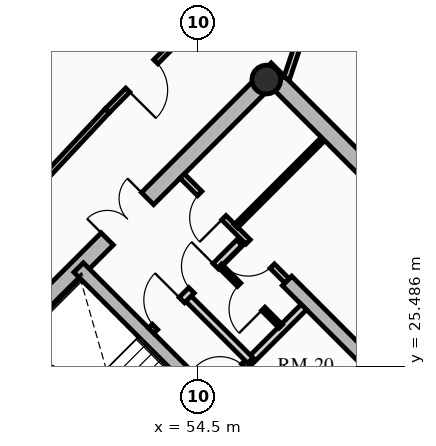
"""IFC4 building model, lengths in metres.
Left out: names, types, materials, properties, quantities, classifications, styles, units other than length and angle.
Written with IfcOpenShell. Run it as: python <this file> out.ifc"""

import sys

from ifc_helpers import new_model, si_unit, direction, frame, frame_2d, origin, origin_2d, place, context, subcontext, project, spatial, rectangle, hollow_circle, extrude, source, transform, mapped, element, fill, save


model = new_model("IFC4")
c1 = context("Model", 3, precision=1e-05, world=origin(), true_north=direction((0.0, 1.0)))
c2 = subcontext(c1, "Body", "Model", "MODEL_VIEW")
j1 = project(units=[si_unit("LENGTHUNIT", "METRE"), si_unit("PLANEANGLEUNIT", "RADIAN")], contexts=[c1])
p1 = place(None, origin())
s1 = spatial("IfcSite", under=j1, at=p1, CompositionType="ELEMENT")
p2 = place(p1, origin())
s2 = spatial("IfcBuilding", under=s1, at=p2, CompositionType="ELEMENT")
p3 = place(p2, frame((0.0, 0.0, 140.32)))
s3 = spatial("IfcBuildingStorey", under=s2, at=p3, CompositionType="ELEMENT", Elevation=140.32)
for number, where, z_axis, x_axis in (
    (1, (58.737, 15.697, 0.0), (0.0, 0.0, 1.0), (-0.707, 0.707, 0.0)),
    (2, (66.303, 23.263, 0.0), (0.0, 0.0, 1.0), (-0.707, 0.707, 0.0)),
):
    element("IfcWall", number, at=place(p3, frame(where, z_axis=z_axis, x_axis=x_axis)), inside=s3, PredefinedType="SHEAR", context=c2, shape_type="SweptSolid", body=[
        extrude(rectangle(XDim=14.2, YDim=0.45, at=frame_2d((7.1, 0.0))), origin(), (0.0, 0.0, 1.0), 3.72),
    ])
p4 = place(p3, frame((48.856, 25.578, 0.0), z_axis=(0.0, 0.0, 1.0), x_axis=(0.707106781187, 0.707106781187, 0.0)))
e3 = element("IfcWall", 3, at=p4, inside=s3, PredefinedType="SHEAR", context=c2, shape_type="SweptSolid", body=[
    extrude(rectangle(XDim=10.7, YDim=0.45, at=frame_2d((5.35, 0.0))), origin(), (0.0, 0.0, 1.0), 3.72),
])
m1 = source(origin(), c2, "Body", "SweptSolid", [
    extrude(rectangle(XDim=1.5, YDim=2.02, at=frame_2d((0.75, 1.01))), frame((0.0, 0.235, 0.0), z_axis=(0.0, -1.0, 0.0), x_axis=(1.0, 0.0, 0.0)), (0.0, 0.0, 1.0), 0.47),
])
p5 = place(p4, frame((4.6, 0.0, 0.0)))
e4 = element("IfcOpeningElement", 4, at=p5, cuts=e3, PredefinedType="OPENING", context=c2, shape_type="MappedRepresentation", body=[
    mapped(m1, transform((0.0, 0.0, 0.0), x_axis=(1.0, 0.0, 0.0), y_axis=(0.0, 1.0, 0.0), z_axis=(0.0, 0.0, 1.0), scale=1.0)),
])
p6 = place(p3, frame((61.078, 18.355, 0.0), z_axis=(0.0, 0.0, 1.0), x_axis=(-0.707106781187, 0.707106781187, 0.0)))
e5 = element("IfcWall", 5, at=p6, inside=s3, PredefinedType="SHEAR", context=c2, shape_type="SweptSolid", body=[
    extrude(rectangle(XDim=13.75, YDim=0.35, at=frame_2d((6.875, 0.0))), origin(), (0.0, 0.0, 1.0), 3.72),
])
m2 = source(origin(), c2, "Body", "SweptSolid", [
    extrude(rectangle(XDim=1.1, YDim=2.015, at=frame_2d((0.55, 1.007))), frame((0.0, 0.185, 0.0), z_axis=(0.0, -1.0, 0.0), x_axis=(1.0, 0.0, 0.0)), (0.0, 0.0, 1.0), 0.37),
])
p7 = place(p6, frame((4.875, 0.0, 0.0)))
e6 = element("IfcOpeningElement", 6, at=p7, cuts=e5, PredefinedType="OPENING", context=c2, shape_type="MappedRepresentation", body=[
    mapped(m2, transform((0.0, 0.0, 0.0), x_axis=(1.0, 0.0, 0.0), y_axis=(0.0, 1.0, 0.0), z_axis=(0.0, 0.0, 1.0), scale=1.0)),
])
p8 = place(p6, frame((0.65, 0.0, 0.0)))
e7 = element("IfcOpeningElement", 7, at=p8, cuts=e5, PredefinedType="OPENING", context=c2, shape_type="MappedRepresentation", body=[
    mapped(m2, transform((0.0, 0.0, 0.0), x_axis=(1.0, 0.0, 0.0), y_axis=(0.0, 1.0, 0.0), z_axis=(0.0, 0.0, 1.0), scale=1.0)),
])
p9 = place(p6, frame((2.65, 0.0, 0.0)))
e8 = element("IfcOpeningElement", 8, at=p9, cuts=e5, PredefinedType="OPENING", context=c2, shape_type="MappedRepresentation", body=[
    mapped(m2, transform((0.0, 0.0, 0.0), x_axis=(1.0, 0.0, 0.0), y_axis=(0.0, 1.0, 0.0), z_axis=(0.0, 0.0, 1.0), scale=1.0)),
])
m3 = source(origin(), c2, "Body", "SweptSolid", [
    extrude(rectangle(XDim=1.15, YDim=2.02, at=frame_2d((0.575, 1.01))), frame((0.0, 0.185, 0.0), z_axis=(0.0, -1.0, 0.0), x_axis=(1.0, 0.0, 0.0)), (0.0, 0.0, 1.0), 0.37),
])
p10 = place(p6, frame((7.295, 0.0, 0.0)))
e9 = element("IfcOpeningElement", 9, at=p10, cuts=e5, PredefinedType="OPENING", context=c2, shape_type="MappedRepresentation", body=[
    mapped(m3, transform((0.0, 0.0, 0.0), x_axis=(1.0, 0.0, 0.0), y_axis=(0.0, 1.0, 0.0), z_axis=(0.0, 0.0, 1.0), scale=1.0)),
])
p11 = place(p3, frame((63.645, 20.922, 0.0), z_axis=(0.0, 0.0, 1.0), x_axis=(-0.70711946392, 0.707094098226, 0.0)))
e10 = element("IfcWall", 10, at=p11, inside=s3, PredefinedType="SHEAR", context=c2, shape_type="SweptSolid", body=[
    extrude(rectangle(XDim=9.625, YDim=0.35, at=frame_2d((4.812, 0.0))), origin(), (0.0, 0.0, 1.0), 3.72),
])
p12 = place(p11, frame((5.305, 0.0, 0.0)))
e11 = element("IfcOpeningElement", 11, at=p12, cuts=e10, PredefinedType="OPENING", context=c2, shape_type="MappedRepresentation", body=[
    mapped(m3, transform((0.0, 0.0, 0.0), x_axis=(1.0, 0.0, 0.0), y_axis=(0.0, 1.0, 0.0), z_axis=(0.0, 0.0, 1.0), scale=1.0)),
])
p13 = place(p3, frame((53.922, 21.141, 0.0), z_axis=(0.0, 0.0, 1.0), x_axis=(-0.707088616009, 0.707124945897, 0.0)))
e12 = element("IfcWall", 12, at=p13, inside=s3, PredefinedType="SHEAR", context=c2, shape_type="SweptSolid", body=[
    extrude(rectangle(XDim=6.72, YDim=0.35, at=frame_2d((3.36, 0.0))), origin(), (0.0, 0.0, 1.0), 3.72),
])
p14 = place(p3, frame((56.294, 33.024, 0.0), z_axis=(0.0, 0.0, 1.0), x_axis=(0.707106781187, 0.707106781187, 0.0)))
e13 = element("IfcColumn", 13, at=p14, inside=s3, PredefinedType="COLUMN", context=c2, shape_type="SweptSolid", body=[
    extrude(hollow_circle(Radius=0.38, WallThickness=0.032, at=origin_2d()), origin(), (0.0, 0.0, 1.0), 3.72),
])
p15 = place(p3, frame((54.961, 24.719, 0.0), z_axis=(0.0, 0.0, 1.0), x_axis=(0.707106781187, 0.707106781187, 0.0)))
e14 = element("IfcWall", 14, at=p15, inside=s3, PredefinedType="PARTITIONING", context=c2, shape_type="SweptSolid", body=[
    extrude(rectangle(XDim=3.28, YDim=0.2, at=frame_2d((1.64, 0.0))), origin(), (0.0, 0.0, 1.0), 3.465),
])
m4 = source(origin(), c2, "Body", "SweptSolid", [
    extrude(rectangle(XDim=0.9, YDim=2.005, at=frame_2d((0.45, 1.002))), frame((0.0, 0.11, 0.0), z_axis=(0.0, -1.0, 0.0), x_axis=(1.0, 0.0, 0.0)), (0.0, 0.0, 1.0), 0.22),
])
p16 = place(p15, frame((0.16, 0.0, 0.0)))
e15 = element("IfcOpeningElement", 15, at=p16, cuts=e14, PredefinedType="OPENING", context=c2, shape_type="MappedRepresentation", body=[
    mapped(m4, transform((0.0, 0.0, 0.0), x_axis=(1.0, 0.0, 0.0), y_axis=(0.0, 1.0, 0.0), z_axis=(0.0, 0.0, 1.0), scale=1.0)),
])
p17 = place(p3, frame((55.874, 25.631, 0.0), z_axis=(0.0, 0.0, 1.0), x_axis=(-0.707157639372, 0.707055919343, 0.0)))
e16 = element("IfcWall", 16, at=p17, inside=s3, PredefinedType="PARTITIONING", context=c2, shape_type="SweptSolid", body=[
    extrude(rectangle(XDim=2.4, YDim=0.2, at=frame_2d((1.2, 0.0))), origin(), (0.0, 0.0, 1.0), 3.465),
])
p18 = place(p3, frame((53.264, 26.416, 0.0), z_axis=(0.0, 0.0, 1.0), x_axis=(0.707106781187, 0.707106781187, 0.0)))
e17 = element("IfcWall", 17, at=p18, inside=s3, PredefinedType="PARTITIONING", context=c2, shape_type="SweptSolid", body=[
    extrude(rectangle(XDim=3.28, YDim=0.2, at=frame_2d((1.64, 0.0))), origin(), (0.0, 0.0, 1.0), 3.465),
])
m5 = source(origin(), c2, "Body", "SweptSolid", [
    extrude(rectangle(XDim=1.0, YDim=2.015, at=frame_2d((0.5, 1.007))), frame((0.0, 0.11, 0.0), z_axis=(0.0, -1.0, 0.0), x_axis=(1.0, 0.0, 0.0)), (0.0, 0.0, 1.0), 0.22),
])
p19 = place(p18, frame((0.14, 0.0, 0.0)))
e18 = element("IfcOpeningElement", 18, at=p19, cuts=e17, PredefinedType="OPENING", context=c2, shape_type="MappedRepresentation", body=[
    mapped(m5, transform((0.0, 0.0, 0.0), x_axis=(1.0, 0.0, 0.0), y_axis=(0.0, 1.0, 0.0), z_axis=(0.0, 0.0, 1.0), scale=1.0)),
])
p20 = place(p18, frame((1.5, 0.0, 0.0)))
e19 = element("IfcOpeningElement", 19, at=p20, cuts=e17, PredefinedType="OPENING", context=c2, shape_type="MappedRepresentation", body=[
    mapped(m4, transform((0.0, 0.0, 0.0), x_axis=(1.0, 0.0, 0.0), y_axis=(0.0, 1.0, 0.0), z_axis=(0.0, 0.0, 1.0), scale=1.0)),
])
p21 = place(p3, frame((56.673, 26.529, 0.0), z_axis=(0.0, 0.0, 1.0), x_axis=(-0.707052764397, 0.70716079385, 0.0)))
e20 = element("IfcWall", 20, at=p21, inside=s3, PredefinedType="PARTITIONING", context=c2, shape_type="SweptSolid", body=[
    extrude(rectangle(XDim=2.26, YDim=0.125, at=frame_2d((1.13, 0.0))), origin(), (0.0, 0.0, 1.0), 3.465),
])
m6 = source(origin(), c2, "Body", "SweptSolid", [
    extrude(rectangle(XDim=0.9, YDim=2.005, at=frame_2d((0.45, 1.002))), frame((0.0, 0.073, 0.0), z_axis=(0.0, -1.0, 0.0), x_axis=(1.0, 0.0, 0.0)), (0.0, 0.0, 1.0), 0.145),
])
p22 = place(p21, frame((0.65, 0.0, 0.0)))
e21 = element("IfcOpeningElement", 21, at=p22, cuts=e20, PredefinedType="OPENING", context=c2, shape_type="MappedRepresentation", body=[
    mapped(m6, transform((0.0, 0.0, 0.0), x_axis=(1.0, 0.0, 0.0), y_axis=(0.0, 1.0, 0.0), z_axis=(0.0, 0.0, 1.0), scale=1.0)),
])
p23 = place(p3, frame((56.839, 27.728, 0.0), z_axis=(0.0, 0.0, 1.0), x_axis=(-0.707106781187, 0.707106781187, 0.0)))
e22 = element("IfcWall", 22, at=p23, inside=s3, PredefinedType="PARTITIONING", context=c2, shape_type="SweptSolid", body=[
    extrude(rectangle(XDim=3.9, YDim=0.16, at=frame_2d((1.95, 0.0))), origin(), (0.0, 0.0, 1.0), 3.465),
])
m7 = source(origin(), c2, "Body", "SweptSolid", [
    extrude(rectangle(XDim=0.9, YDim=2.005, at=frame_2d((0.45, 1.002))), frame((0.0, 0.09, 0.0), z_axis=(0.0, -1.0, 0.0), x_axis=(1.0, 0.0, 0.0)), (0.0, 0.0, 1.0), 0.18),
])
p24 = place(p23, frame((0.55, 0.0, 0.0)))
e23 = element("IfcOpeningElement", 23, at=p24, cuts=e22, PredefinedType="OPENING", context=c2, shape_type="MappedRepresentation", body=[
    mapped(m7, transform((0.0, 0.0, 0.0), x_axis=(1.0, 0.0, 0.0), y_axis=(0.0, 1.0, 0.0), z_axis=(0.0, 0.0, 1.0), scale=1.0)),
])
p25 = place(p23, frame((2.35, 0.0, 0.0)))
e24 = element("IfcOpeningElement", 24, at=p25, cuts=e22, PredefinedType="OPENING", context=c2, shape_type="MappedRepresentation", body=[
    mapped(m7, transform((0.0, 0.0, 0.0), x_axis=(1.0, 0.0, 0.0), y_axis=(0.0, 1.0, 0.0), z_axis=(0.0, 0.0, 1.0), scale=1.0)),
])
p26 = place(p3, frame((55.492, 29.167, 0.0), z_axis=(0.0, 0.0, 1.0), x_axis=(0.707144688645, 0.707068871696, 0.0)))
e25 = element("IfcWall", 25, at=p26, inside=s3, PredefinedType="PARTITIONING", context=c2, shape_type="SweptSolid", body=[
    extrude(rectangle(XDim=3.22, YDim=0.125, at=frame_2d((1.61, 0.0))), origin(), (0.0, 0.0, 1.0), 3.002),
])
p27 = place(p3, frame((54.475, 34.591, 0.0), z_axis=(0.0, 0.0, 1.0), x_axis=(-0.703869646439, -0.710329163714, 0.0)))
e26 = element("IfcWall", 26, at=p27, inside=s3, PredefinedType="PARTITIONING", context=c2, shape_type="SweptSolid", body=[
    extrude(rectangle(XDim=3.364, YDim=0.15, at=frame_2d((1.682, 0.0))), origin(), (0.0, 0.0, 1.0), 3.035),
])
m8 = source(origin(), c2, "Body", "SweptSolid", [
    extrude(rectangle(XDim=1.05, YDim=2.015, at=frame_2d((0.525, 1.007))), frame((0.0, 0.085, 0.0), z_axis=(0.0, -1.0, 0.0), x_axis=(1.0, 0.0, 0.0)), (0.0, 0.0, 1.0), 0.17),
])
p28 = place(p27, frame((1.546, 0.0, 0.0)))
e27 = element("IfcOpeningElement", 27, at=p28, cuts=e26, PredefinedType="OPENING", context=c2, shape_type="MappedRepresentation", body=[
    mapped(m8, transform((0.0, 0.0, 0.0), x_axis=(1.0, 0.0, 0.0), y_axis=(0.0, 1.0, 0.0), z_axis=(0.0, 0.0, 1.0), scale=1.0)),
])
p29 = place(p3, frame((52.107, 32.202, 0.0), z_axis=(0.0, 0.0, 1.0), x_axis=(-0.682605209028, -0.730787334734, 0.0)))
e28 = element("IfcWall", 28, at=p29, inside=s3, PredefinedType="PARTITIONING", context=c2, shape_type="SweptSolid", body=[
    extrude(rectangle(XDim=6.486, YDim=0.15, at=frame_2d((3.243, 0.0))), origin(), (0.0, 0.0, 1.0), 3.035),
])
p30 = place(p3, frame((56.828, 33.056, 0.0), z_axis=(0.0, 0.0, 1.0), x_axis=(0.319439175969, 0.94760678177, 0.0)))
e29 = element("IfcWall", 29, at=p30, inside=s3, PredefinedType="PARTITIONING", context=c2, shape_type="SweptSolid", body=[
    extrude(rectangle(XDim=2.074, YDim=0.16, at=frame_2d((1.037, 0.0))), origin(), (0.0, 0.0, 1.0), 3.035),
])
m9 = source(origin(), c2, "Body", "SweptSolid", [
    extrude(rectangle(XDim=1.05, YDim=2.015, at=frame_2d((0.525, 1.007))), frame((0.0, 0.09, 0.0), z_axis=(0.0, -1.0, 0.0), x_axis=(1.0, 0.0, 0.0)), (0.0, 0.0, 1.0), 0.18),
])
p31 = place(p30, frame((0.824, 0.0, 0.0)))
e30 = element("IfcOpeningElement", 30, at=p31, cuts=e29, PredefinedType="OPENING", context=c2, shape_type="MappedRepresentation", body=[
    mapped(m9, transform((0.0, 0.0, 0.0), x_axis=(1.0, 0.0, 0.0), y_axis=(0.0, 1.0, 0.0), z_axis=(0.0, 0.0, 1.0), scale=1.0)),
])
m10 = source(origin(), c2, "Body", "SweptSolid", [
    extrude(rectangle(XDim=1.5, YDim=2.02, at=frame_2d((0.75, 1.01))), frame((0.0, 0.025, 0.0), z_axis=(0.0, -1.0, 0.0), x_axis=(1.0, 0.0, 0.0)), (0.0, 0.0, 1.0), 0.05),
])
p32 = place(p5, origin())
e31 = element("IfcDoor", 31, at=p32, inside=s3, OperationType="DOUBLE_DOOR_SINGLE_SWING", PredefinedType="DOOR", context=c2, shape_type="MappedRepresentation", body=[
    mapped(m10, transform((0.0, 0.0, 0.0), x_axis=(1.0, 0.0, 0.0), y_axis=(0.0, 1.0, 0.0), z_axis=(0.0, 0.0, 1.0), scale=1.0)),
])
fill(e4, e31)
m11 = source(origin(), c2, "Body", "SweptSolid", [
    extrude(rectangle(XDim=0.9, YDim=2.005, at=frame_2d((0.45, 1.002))), frame((0.0, 0.025, 0.0), z_axis=(0.0, -1.0, 0.0), x_axis=(1.0, 0.0, 0.0)), (0.0, 0.0, 1.0), 0.05),
])
p33 = place(p16, origin())
e32 = element("IfcDoor", 32, at=p33, inside=s3, OperationType="SINGLE_SWING_LEFT", PredefinedType="DOOR", context=c2, shape_type="MappedRepresentation", body=[
    mapped(m11, transform((0.0, 0.0, 0.0), x_axis=(1.0, 0.0, 0.0), y_axis=(0.0, 1.0, 0.0), z_axis=(0.0, 0.0, 1.0), scale=1.0)),
])
fill(e15, e32)
m12 = source(origin(), c2, "Body", "SweptSolid", [
    extrude(rectangle(XDim=1.0, YDim=2.015, at=frame_2d((0.5, 1.007))), frame((0.0, 0.025, 0.0), z_axis=(0.0, -1.0, 0.0), x_axis=(1.0, 0.0, 0.0)), (0.0, 0.0, 1.0), 0.05),
])
p34 = place(p19, origin())
e33 = element("IfcDoor", 33, at=p34, inside=s3, OperationType="SINGLE_SWING_RIGHT", PredefinedType="DOOR", context=c2, shape_type="MappedRepresentation", body=[
    mapped(m12, transform((0.0, 0.0, 0.0), x_axis=(1.0, 0.0, 0.0), y_axis=(0.0, 1.0, 0.0), z_axis=(0.0, 0.0, 1.0), scale=1.0)),
])
fill(e18, e33)
p35 = place(p20, origin())
e34 = element("IfcDoor", 34, at=p35, inside=s3, OperationType="SINGLE_SWING_RIGHT", PredefinedType="DOOR", context=c2, shape_type="MappedRepresentation", body=[
    mapped(m11, transform((0.0, 0.0, 0.0), x_axis=(1.0, 0.0, 0.0), y_axis=(0.0, 1.0, 0.0), z_axis=(0.0, 0.0, 1.0), scale=1.0)),
])
fill(e19, e34)
p36 = place(p22, origin())
e35 = element("IfcDoor", 35, at=p36, inside=s3, OperationType="SINGLE_SWING_LEFT", PredefinedType="DOOR", context=c2, shape_type="MappedRepresentation", body=[
    mapped(m11, transform((0.0, 0.0, 0.0), x_axis=(1.0, 0.0, 0.0), y_axis=(0.0, 1.0, 0.0), z_axis=(0.0, 0.0, 1.0), scale=1.0)),
])
fill(e21, e35)
p37 = place(p24, origin())
e36 = element("IfcDoor", 36, at=p37, inside=s3, OperationType="SINGLE_SWING_RIGHT", PredefinedType="DOOR", context=c2, shape_type="MappedRepresentation", body=[
    mapped(m11, transform((0.0, 0.0, 0.0), x_axis=(1.0, 0.0, 0.0), y_axis=(0.0, 1.0, 0.0), z_axis=(0.0, 0.0, 1.0), scale=1.0)),
])
fill(e23, e36)
p38 = place(p25, origin())
e37 = element("IfcDoor", 37, at=p38, inside=s3, OperationType="SINGLE_SWING_LEFT", PredefinedType="DOOR", context=c2, shape_type="MappedRepresentation", body=[
    mapped(m11, transform((0.0, 0.0, 0.0), x_axis=(1.0, 0.0, 0.0), y_axis=(0.0, 1.0, 0.0), z_axis=(0.0, 0.0, 1.0), scale=1.0)),
])
fill(e24, e37)
m13 = source(origin(), c2, "Body", "SweptSolid", [
    extrude(rectangle(XDim=1.05, YDim=2.015, at=frame_2d((0.525, 1.007))), frame((0.0, 0.025, 0.0), z_axis=(0.0, -1.0, 0.0), x_axis=(1.0, 0.0, 0.0)), (0.0, 0.0, 1.0), 0.05),
])
p39 = place(p28, origin())
e38 = element("IfcDoor", 38, at=p39, inside=s3, OperationType="SINGLE_SWING_RIGHT", PredefinedType="DOOR", context=c2, shape_type="MappedRepresentation", body=[
    mapped(m13, transform((0.0, 0.0, 0.0), x_axis=(1.0, 0.0, 0.0), y_axis=(0.0, 1.0, 0.0), z_axis=(0.0, 0.0, 1.0), scale=1.0)),
])
fill(e27, e38)
save(model, sys.argv[1])
